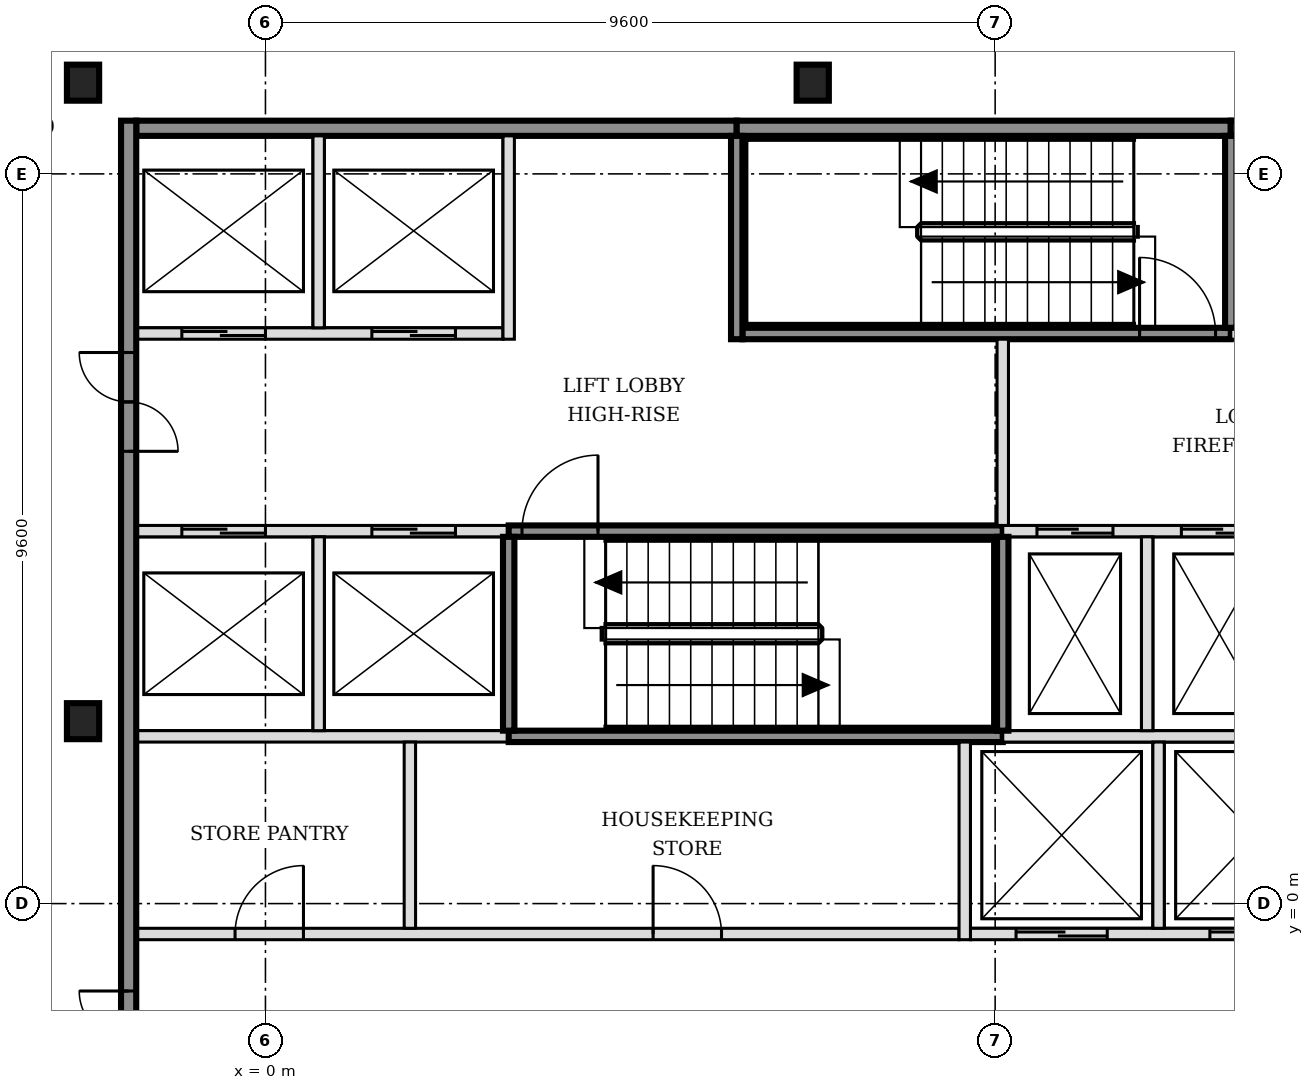
"""IFC4 building model, lengths in metres.
Left out: names, types, materials, properties, quantities, classifications, styles, units other than length and angle.
Written with IfcOpenShell. Run it as: python <this file> out.ifc"""

import sys

from ifc_helpers import new_model, si_unit, direction, frame, frame_2d, origin, origin_2d, place, context, subcontext, project, spatial, rectangle, i_section, extrude, element, fill, save


model = new_model("IFC4")
c1 = context("Model", 3, precision=1e-05, world=origin(), true_north=direction((0.0, 1.0)))
c2 = subcontext(c1, "Body", "Model", "MODEL_VIEW")
j1 = project(units=[si_unit("LENGTHUNIT", "METRE"), si_unit("PLANEANGLEUNIT", "RADIAN")], contexts=[c1])
p1 = place(None, origin())
s1 = spatial("IfcSite", under=j1, at=p1, CompositionType="ELEMENT")
p2 = place(p1, origin())
s2 = spatial("IfcBuilding", under=s1, at=p2, CompositionType="ELEMENT")
p3 = place(p2, frame((0.0, 0.0, 139.8)))
s3 = spatial("IfcBuildingStorey", under=s2, at=p3, CompositionType="ELEMENT", Elevation=139.8)
for number, where, z_axis, x_axis in (
    (1, (-2.4, 2.4, -0.15), (0.0, 0.0, 1.0), (1.0, 0.0, 0.0)),
    (2, (-2.4, 10.8, -0.15), (0.0, 0.0, 1.0), (1.0, 0.0, 0.0)),
    (3, (7.2, 10.8, -0.15), (0.0, 0.0, 1.0), (1.0, 0.0, 0.0)),
):
    element("IfcColumn", number, at=place(p3, frame(where, z_axis=z_axis, x_axis=x_axis)), inside=s3, PredefinedType="COLUMN", context=c2, shape_type="SweptSolid", body=[
        extrude(i_section(OverallWidth=0.424, OverallDepth=0.474, WebThickness=0.048, FlangeThickness=0.077, FilletRadius=0.015, at=origin_2d()), origin(), (0.0, 0.0, 1.0), 3.6),
    ])
p4 = place(p3, frame((-1.7, -0.4, 0.0), z_axis=(0.0, 0.0, 1.0), x_axis=(1.0, 0.0, 0.0)))
e4 = element("IfcWall", 4, at=p4, inside=s3, PredefinedType="PARTITIONING", context=c2, shape_type="SweptSolid", body=[
    extrude(rectangle(XDim=10.825, YDim=0.15, at=frame_2d((5.413, 0.0))), origin(), (0.0, 0.0, 1.0), 3.45),
])
p5 = place(p4, frame((1.3, 0.0, 0.0)))
e5 = element("IfcOpeningElement", 5, at=p5, cuts=e4, PredefinedType="OPENING", context=c2, shape_type="SweptSolid", body=[
    extrude(rectangle(XDim=0.9, YDim=2.1, at=frame_2d((0.45, 1.05))), frame((0.0, 0.085, 0.0), z_axis=(0.0, -1.0, 0.0), x_axis=(1.0, 0.0, 0.0)), (0.0, 0.0, 1.0), 0.17),
])
p6 = place(p4, frame((6.8, 0.0, 0.0)))
e6 = element("IfcOpeningElement", 6, at=p6, cuts=e4, PredefinedType="OPENING", context=c2, shape_type="SweptSolid", body=[
    extrude(rectangle(XDim=0.9, YDim=2.1, at=frame_2d((0.45, 1.05))), frame((0.0, 0.085, 0.0), z_axis=(0.0, -1.0, 0.0), x_axis=(1.0, 0.0, 0.0)), (0.0, 0.0, 1.0), 0.17),
])
p7 = place(p3, frame((9.275, -0.4, 0.0), z_axis=(0.0, 0.0, 1.0), x_axis=(1.0, 0.0, 0.0)))
e7 = element("IfcWall", 7, at=p7, inside=s3, PredefinedType="SOLIDWALL", context=c2, shape_type="SweptSolid", body=[
    extrude(rectangle(XDim=4.95, YDim=0.15, at=frame_2d((2.475, 0.0))), origin(), (0.0, 0.0, 1.0), 3.45),
])
p8 = place(p7, frame((0.6, 0.0, 0.0)))
e8 = element("IfcOpeningElement", 8, at=p8, cuts=e7, PredefinedType="OPENING", context=c2, shape_type="SweptSolid", body=[
    extrude(rectangle(XDim=1.2, YDim=2.1, at=frame_2d((0.6, 1.05))), frame((0.0, 0.085, 0.0), z_axis=(0.0, -1.0, 0.0), x_axis=(1.0, 0.0, 0.0)), (0.0, 0.0, 1.0), 0.17),
])
p9 = place(p7, frame((3.15, 0.0, 0.0)))
e9 = element("IfcOpeningElement", 9, at=p9, cuts=e7, PredefinedType="OPENING", context=c2, shape_type="SweptSolid", body=[
    extrude(rectangle(XDim=1.2, YDim=2.1, at=frame_2d((0.6, 1.05))), frame((0.0, 0.085, 0.0), z_axis=(0.0, -1.0, 0.0), x_axis=(1.0, 0.0, 0.0)), (0.0, 0.0, 1.0), 0.17),
])
p10 = place(p3, frame((-1.7, 2.2, 0.0), z_axis=(0.0, 0.0, 1.0), x_axis=(1.0, 0.0, 0.0)))
e10 = element("IfcWall", 10, at=p10, inside=s3, PredefinedType="SOLIDWALL", context=c2, shape_type="SweptSolid", body=[
    extrude(rectangle(XDim=4.9, YDim=0.15, at=frame_2d((2.45, 0.0))), origin(), (0.0, 0.0, 1.0), 3.45),
])
p11 = place(p3, frame((3.2, 2.2, 0.0), z_axis=(0.0, 0.0, 1.0), x_axis=(1.0, 0.0, 0.0)))
e11 = element("IfcWall", 11, at=p11, inside=s3, PredefinedType="SOLIDWALL", context=c2, shape_type="SweptSolid", body=[
    extrude(rectangle(XDim=6.5, YDim=0.15, at=frame_2d((3.25, 0.0))), origin(), (0.0, 0.0, 1.0), 3.45),
])
p12 = place(p3, frame((9.7, 2.2, 0.0), z_axis=(0.0, 0.0, 1.0), x_axis=(1.0, 0.0, 0.0)))
e12 = element("IfcWall", 12, at=p12, inside=s3, PredefinedType="SOLIDWALL", context=c2, shape_type="SweptSolid", body=[
    extrude(rectangle(XDim=4.525, YDim=0.15, at=frame_2d((2.263, 0.0))), origin(), (0.0, 0.0, 1.0), 3.45),
])
p13 = place(p3, frame((-1.7, 4.9, 0.0), z_axis=(0.0, 0.0, 1.0), x_axis=(1.0, 0.0, 0.0)))
e13 = element("IfcWall", 13, at=p13, inside=s3, PredefinedType="SOLIDWALL", context=c2, shape_type="SweptSolid", body=[
    extrude(rectangle(XDim=4.9, YDim=0.15, at=frame_2d((2.45, 0.0))), origin(), (0.0, 0.0, 1.0), 3.45),
])
p14 = place(p13, frame((0.6, 0.0, 0.0)))
e14 = element("IfcOpeningElement", 14, at=p14, cuts=e13, PredefinedType="OPENING", context=c2, shape_type="SweptSolid", body=[
    extrude(rectangle(XDim=1.1, YDim=2.1, at=frame_2d((0.55, 1.05))), frame((0.0, 0.085, 0.0), z_axis=(0.0, -1.0, 0.0), x_axis=(1.0, 0.0, 0.0)), (0.0, 0.0, 1.0), 0.17),
])
p15 = place(p13, frame((3.1, 0.0, 0.0)))
e15 = element("IfcOpeningElement", 15, at=p15, cuts=e13, PredefinedType="OPENING", context=c2, shape_type="SweptSolid", body=[
    extrude(rectangle(XDim=1.1, YDim=2.1, at=frame_2d((0.55, 1.05))), frame((0.0, 0.085, 0.0), z_axis=(0.0, -1.0, 0.0), x_axis=(1.0, 0.0, 0.0)), (0.0, 0.0, 1.0), 0.17),
])
p16 = place(p3, frame((3.2, 4.9, 0.0), z_axis=(0.0, 0.0, 1.0), x_axis=(1.0, 0.0, 0.0)))
e16 = element("IfcWall", 16, at=p16, inside=s3, PredefinedType="SOLIDWALL", context=c2, shape_type="SweptSolid", body=[
    extrude(rectangle(XDim=6.5, YDim=0.15, at=frame_2d((3.25, 0.0))), origin(), (0.0, 0.0, 1.0), 3.45),
])
p17 = place(p16, frame((0.175, 0.0, 0.0)))
e17 = element("IfcOpeningElement", 17, at=p17, cuts=e16, PredefinedType="OPENING", context=c2, shape_type="SweptSolid", body=[
    extrude(rectangle(XDim=1.0, YDim=2.1, at=frame_2d((0.5, 1.05))), frame((0.0, 0.085, 0.0), z_axis=(0.0, -1.0, 0.0), x_axis=(1.0, 0.0, 0.0)), (0.0, 0.0, 1.0), 0.17),
])
p18 = place(p3, frame((9.7, 4.9, 0.0), z_axis=(0.0, 0.0, 1.0), x_axis=(1.0, 0.0, 0.0)))
e18 = element("IfcWall", 18, at=p18, inside=s3, PredefinedType="SOLIDWALL", context=c2, shape_type="SweptSolid", body=[
    extrude(rectangle(XDim=6.4, YDim=0.15, at=frame_2d((3.2, 0.0))), origin(), (0.0, 0.0, 1.0), 3.45),
])
p19 = place(p18, frame((0.45, 0.0, 0.0)))
e19 = element("IfcOpeningElement", 19, at=p19, cuts=e18, PredefinedType="OPENING", context=c2, shape_type="SweptSolid", body=[
    extrude(rectangle(XDim=1.0, YDim=2.1, at=frame_2d((0.5, 1.05))), frame((0.0, 0.085, 0.0), z_axis=(0.0, -1.0, 0.0), x_axis=(1.0, 0.0, 0.0)), (0.0, 0.0, 1.0), 0.17),
])
p20 = place(p18, frame((2.35, 0.0, 0.0)))
e20 = element("IfcOpeningElement", 20, at=p20, cuts=e18, PredefinedType="OPENING", context=c2, shape_type="SweptSolid", body=[
    extrude(rectangle(XDim=1.0, YDim=2.1, at=frame_2d((0.5, 1.05))), frame((0.0, 0.085, 0.0), z_axis=(0.0, -1.0, 0.0), x_axis=(1.0, 0.0, 0.0)), (0.0, 0.0, 1.0), 0.17),
])
p21 = place(p18, frame((4.7, 0.0, 0.0)))
e21 = element("IfcOpeningElement", 21, at=p21, cuts=e18, PredefinedType="OPENING", context=c2, shape_type="SweptSolid", body=[
    extrude(rectangle(XDim=0.9, YDim=2.1, at=frame_2d((0.45, 1.05))), frame((0.0, 0.085, 0.0), z_axis=(0.0, -1.0, 0.0), x_axis=(1.0, 0.0, 0.0)), (0.0, 0.0, 1.0), 0.17),
])
p22 = place(p3, frame((-1.7, 7.5, 0.0), z_axis=(0.0, 0.0, 1.0), x_axis=(1.0, 0.0, 0.0)))
e22 = element("IfcWall", 22, at=p22, inside=s3, PredefinedType="SOLIDWALL", context=c2, shape_type="SweptSolid", body=[
    extrude(rectangle(XDim=4.825, YDim=0.15, at=frame_2d((2.413, 0.0))), origin(), (0.0, 0.0, 1.0), 3.45),
])
p23 = place(p22, frame((0.6, 0.0, 0.0)))
e23 = element("IfcOpeningElement", 23, at=p23, cuts=e22, PredefinedType="OPENING", context=c2, shape_type="SweptSolid", body=[
    extrude(rectangle(XDim=1.1, YDim=2.1, at=frame_2d((0.55, 1.05))), frame((0.0, 0.085, 0.0), z_axis=(0.0, -1.0, 0.0), x_axis=(1.0, 0.0, 0.0)), (0.0, 0.0, 1.0), 0.17),
])
p24 = place(p22, frame((3.1, 0.0, 0.0)))
e24 = element("IfcOpeningElement", 24, at=p24, cuts=e22, PredefinedType="OPENING", context=c2, shape_type="SweptSolid", body=[
    extrude(rectangle(XDim=1.1, YDim=2.1, at=frame_2d((0.55, 1.05))), frame((0.0, 0.085, 0.0), z_axis=(0.0, -1.0, 0.0), x_axis=(1.0, 0.0, 0.0)), (0.0, 0.0, 1.0), 0.17),
])
p25 = place(p3, frame((6.275, 7.5, 0.0), z_axis=(0.0, 0.0, 1.0), x_axis=(1.0, 0.0, 0.0)))
e25 = element("IfcWall", 25, at=p25, inside=s3, PredefinedType="SOLIDWALL", context=c2, shape_type="SweptSolid", body=[
    extrude(rectangle(XDim=6.425, YDim=0.15, at=frame_2d((3.212, 0.0))), origin(), (0.0, 0.0, 1.0), 3.45),
])
p26 = place(p25, frame((5.225, 0.0, 0.0)))
e26 = element("IfcOpeningElement", 26, at=p26, cuts=e25, PredefinedType="OPENING", context=c2, shape_type="SweptSolid", body=[
    extrude(rectangle(XDim=1.0, YDim=2.1, at=frame_2d((0.5, 1.05))), frame((0.0, 0.085, 0.0), z_axis=(0.0, -1.0, 0.0), x_axis=(1.0, 0.0, 0.0)), (0.0, 0.0, 1.0), 0.17),
])
p27 = place(p3, frame((12.7, 7.5, 0.0), z_axis=(0.0, 0.0, 1.0), x_axis=(1.0, 0.0, 0.0)))
e27 = element("IfcWall", 27, at=p27, inside=s3, PredefinedType="SOLIDWALL", context=c2, shape_type="SweptSolid", body=[
    extrude(rectangle(XDim=3.4, YDim=0.15, at=frame_2d((1.7, 0.0))), origin(), (0.0, 0.0, 1.0), 3.45),
])
p28 = place(p27, frame((1.3, 0.0, 0.0)))
e28 = element("IfcOpeningElement", 28, at=p28, cuts=e27, PredefinedType="OPENING", context=c2, shape_type="SweptSolid", body=[
    extrude(rectangle(XDim=0.9, YDim=2.1, at=frame_2d((0.45, 1.05))), frame((0.0, 0.085, 0.0), z_axis=(0.0, -1.0, 0.0), x_axis=(1.0, 0.0, 0.0)), (0.0, 0.0, 1.0), 0.17),
])
p29 = place(p3, frame((-1.7, 10.2, 0.0), z_axis=(0.0, 0.0, 1.0), x_axis=(1.0, 0.0, 0.0)))
e29 = element("IfcWall", 29, at=p29, inside=s3, PredefinedType="SOLIDWALL", context=c2, shape_type="SweptSolid", body=[
    extrude(rectangle(XDim=7.9, YDim=0.2, at=frame_2d((3.95, 0.0))), origin(), (0.0, 0.0, 1.0), 3.45),
])
p30 = place(p3, frame((6.2, 10.2, 0.0), z_axis=(0.0, 0.0, 1.0), x_axis=(1.0, 0.0, 0.0)))
e30 = element("IfcWall", 30, at=p30, inside=s3, PredefinedType="SOLIDWALL", context=c2, shape_type="SweptSolid", body=[
    extrude(rectangle(XDim=6.5, YDim=0.2, at=frame_2d((3.25, 0.0))), origin(), (0.0, 0.0, 1.0), 3.45),
])
p31 = place(p3, frame((12.7, 10.2, 0.0), z_axis=(0.0, 0.0, 1.0), x_axis=(1.0, 0.0, 0.0)))
e31 = element("IfcWall", 31, at=p31, inside=s3, PredefinedType="SOLIDWALL", context=c2, shape_type="SweptSolid", body=[
    extrude(rectangle(XDim=3.4, YDim=0.2, at=frame_2d((1.7, 0.0))), origin(), (0.0, 0.0, 1.0), 3.45),
])
p32 = place(p3, frame((-1.8, -5.5, 0.0), z_axis=(0.0, 0.0, 1.0), x_axis=(0.0, 1.0, 0.0)))
e32 = element("IfcWall", 32, at=p32, inside=s3, PredefinedType="SOLIDWALL", context=c2, shape_type="SweptSolid", body=[
    extrude(rectangle(XDim=15.8, YDim=0.2, at=frame_2d((7.9, 0.0))), origin(), (0.0, 0.0, 1.0), 3.45),
])
p33 = place(p32, frame((3.05, 0.0, 0.0)))
e33 = element("IfcOpeningElement", 33, at=p33, cuts=e32, PredefinedType="OPENING", context=c2, shape_type="SweptSolid", body=[
    extrude(rectangle(XDim=1.3, YDim=2.1, at=frame_2d((0.65, 1.05))), frame((0.0, 0.11, 0.0), z_axis=(0.0, -1.0, 0.0), x_axis=(1.0, 0.0, 0.0)), (0.0, 0.0, 1.0), 0.22),
])
p34 = place(p32, frame((11.45, 0.0, 0.0)))
e34 = element("IfcOpeningElement", 34, at=p34, cuts=e32, PredefinedType="OPENING", context=c2, shape_type="SweptSolid", body=[
    extrude(rectangle(XDim=1.3, YDim=2.1, at=frame_2d((0.65, 1.05))), frame((0.0, 0.11, 0.0), z_axis=(0.0, -1.0, 0.0), x_axis=(1.0, 0.0, 0.0)), (0.0, 0.0, 1.0), 0.22),
])
p35 = place(p3, frame((0.7, 2.275, 0.0), z_axis=(0.0, 0.0, 1.0), x_axis=(0.0, 1.0, 0.0)))
e35 = element("IfcWall", 35, at=p35, inside=s3, PredefinedType="SOLIDWALL", context=c2, shape_type="SweptSolid", body=[
    extrude(rectangle(XDim=2.55, YDim=0.15, at=frame_2d((1.275, 0.0))), origin(), (0.0, 0.0, 1.0), 3.45),
])
p36 = place(p3, frame((0.7, 7.575, 0.0), z_axis=(0.0, 0.0, 1.0), x_axis=(0.0, 1.0, 0.0)))
e36 = element("IfcWall", 36, at=p36, inside=s3, PredefinedType="SOLIDWALL", context=c2, shape_type="SweptSolid", body=[
    extrude(rectangle(XDim=2.525, YDim=0.15, at=frame_2d((1.263, 0.0))), origin(), (0.0, 0.0, 1.0), 3.45),
])
p37 = place(p3, frame((1.9, -0.325, 0.0), z_axis=(0.0, 0.0, 1.0), x_axis=(0.0, 1.0, 0.0)))
e37 = element("IfcWall", 37, at=p37, inside=s3, PredefinedType="PARTITIONING", context=c2, shape_type="SweptSolid", body=[
    extrude(rectangle(XDim=2.45, YDim=0.15, at=frame_2d((1.225, 0.0))), origin(), (0.0, 0.0, 1.0), 3.45),
])
p38 = place(p3, frame((3.2, 2.275, 0.0), z_axis=(0.0, 0.0, 1.0), x_axis=(0.0, 1.0, 0.0)))
e38 = element("IfcWall", 38, at=p38, inside=s3, PredefinedType="SOLIDWALL", context=c2, shape_type="SweptSolid", body=[
    extrude(rectangle(XDim=2.55, YDim=0.15, at=frame_2d((1.275, 0.0))), origin(), (0.0, 0.0, 1.0), 3.45),
])
for number, where, z_axis, x_axis in (
    (39, (3.2, 7.425, 0.0), (0.0, 0.0, 1.0), (0.0, 1.0, 0.0)),
    (40, (6.2, 7.425, 0.0), (0.0, 0.0, 1.0), (0.0, 1.0, 0.0)),
):
    element("IfcWall", number, at=place(p3, frame(where, z_axis=z_axis, x_axis=x_axis)), inside=s3, PredefinedType="SOLIDWALL", context=c2, shape_type="SweptSolid", body=[
        extrude(rectangle(XDim=2.675, YDim=0.15, at=frame_2d((1.337, 0.0))), origin(), (0.0, 0.0, 1.0), 3.45),
    ])
p39 = place(p3, frame((9.2, -0.475, 0.0), z_axis=(0.0, 0.0, 1.0), x_axis=(0.0, 1.0, 0.0)))
e41 = element("IfcWall", 41, at=p39, inside=s3, PredefinedType="SOLIDWALL", context=c2, shape_type="SweptSolid", body=[
    extrude(rectangle(XDim=2.6, YDim=0.15, at=frame_2d((1.3, 0.0))), origin(), (0.0, 0.0, 1.0), 3.45),
])
p40 = place(p3, frame((9.7, 2.275, 0.0), z_axis=(0.0, 0.0, 1.0), x_axis=(0.0, 1.0, 0.0)))
e42 = element("IfcWall", 42, at=p40, inside=s3, PredefinedType="SOLIDWALL", context=c2, shape_type="SweptSolid", body=[
    extrude(rectangle(XDim=2.55, YDim=0.15, at=frame_2d((1.275, 0.0))), origin(), (0.0, 0.0, 1.0), 3.45),
])
p41 = place(p3, frame((9.7, 4.975, 0.0), z_axis=(0.0, 0.0, 1.0), x_axis=(0.0, 1.0, 0.0)))
e43 = element("IfcWall", 43, at=p41, inside=s3, PredefinedType="SOLIDWALL", context=c2, shape_type="SweptSolid", body=[
    extrude(rectangle(XDim=2.45, YDim=0.15, at=frame_2d((1.225, 0.0))), origin(), (0.0, 0.0, 1.0), 3.45),
])
p42 = place(p3, frame((11.6, 2.275, 0.0), z_axis=(0.0, 0.0, 1.0), x_axis=(0.0, 1.0, 0.0)))
e44 = element("IfcWall", 44, at=p42, inside=s3, PredefinedType="SOLIDWALL", context=c2, shape_type="SweptSolid", body=[
    extrude(rectangle(XDim=2.55, YDim=0.15, at=frame_2d((1.275, 0.0))), origin(), (0.0, 0.0, 1.0), 3.45),
])
p43 = place(p3, frame((11.75, -0.325, 0.0), z_axis=(0.0, 0.0, 1.0), x_axis=(0.0, 1.0, 0.0)))
e45 = element("IfcWall", 45, at=p43, inside=s3, PredefinedType="SOLIDWALL", context=c2, shape_type="SweptSolid", body=[
    extrude(rectangle(XDim=2.45, YDim=0.15, at=frame_2d((1.225, 0.0))), origin(), (0.0, 0.0, 1.0), 3.45),
])
p44 = place(p3, frame((12.7, 7.575, 0.0), z_axis=(0.0, 0.0, 1.0), x_axis=(0.0, 1.0, 0.0)))
e46 = element("IfcWall", 46, at=p44, inside=s3, PredefinedType="SOLIDWALL", context=c2, shape_type="SweptSolid", body=[
    extrude(rectangle(XDim=2.525, YDim=0.15, at=frame_2d((1.263, 0.0))), origin(), (0.0, 0.0, 1.0), 3.45),
])
p45 = place(p8, origin())
e47 = element("IfcDoor", 47, at=p45, inside=s3, OperationType="DOUBLE_DOOR_SLIDING", PredefinedType="DOOR", context=c2, shape_type="SweptSolid", body=[
    extrude(rectangle(XDim=1.2, YDim=2.1, at=frame_2d((0.6, 1.05))), frame((0.0, 0.025, 0.0), z_axis=(0.0, -1.0, 0.0), x_axis=(1.0, 0.0, 0.0)), (0.0, 0.0, 1.0), 0.05),
])
fill(e8, e47)
p46 = place(p9, origin())
e48 = element("IfcDoor", 48, at=p46, inside=s3, OperationType="DOUBLE_DOOR_SLIDING", PredefinedType="DOOR", context=c2, shape_type="SweptSolid", body=[
    extrude(rectangle(XDim=1.2, YDim=2.1, at=frame_2d((0.6, 1.05))), frame((0.0, 0.025, 0.0), z_axis=(0.0, -1.0, 0.0), x_axis=(1.0, 0.0, 0.0)), (0.0, 0.0, 1.0), 0.05),
])
fill(e9, e48)
p47 = place(p14, origin())
e49 = element("IfcDoor", 49, at=p47, inside=s3, OperationType="DOUBLE_DOOR_SLIDING", PredefinedType="DOOR", context=c2, shape_type="SweptSolid", body=[
    extrude(rectangle(XDim=1.1, YDim=2.1, at=frame_2d((0.55, 1.05))), frame((0.0, 0.025, 0.0), z_axis=(0.0, -1.0, 0.0), x_axis=(1.0, 0.0, 0.0)), (0.0, 0.0, 1.0), 0.05),
])
fill(e14, e49)
p48 = place(p15, origin())
e50 = element("IfcDoor", 50, at=p48, inside=s3, OperationType="DOUBLE_DOOR_SLIDING", PredefinedType="DOOR", context=c2, shape_type="SweptSolid", body=[
    extrude(rectangle(XDim=1.1, YDim=2.1, at=frame_2d((0.55, 1.05))), frame((0.0, 0.025, 0.0), z_axis=(0.0, -1.0, 0.0), x_axis=(1.0, 0.0, 0.0)), (0.0, 0.0, 1.0), 0.05),
])
fill(e15, e50)
p49 = place(p23, origin())
e51 = element("IfcDoor", 51, at=p49, inside=s3, OperationType="DOUBLE_DOOR_SLIDING", PredefinedType="DOOR", context=c2, shape_type="SweptSolid", body=[
    extrude(rectangle(XDim=1.1, YDim=2.1, at=frame_2d((0.55, 1.05))), frame((0.0, 0.025, 0.0), z_axis=(0.0, -1.0, 0.0), x_axis=(1.0, 0.0, 0.0)), (0.0, 0.0, 1.0), 0.05),
])
fill(e23, e51)
p50 = place(p24, origin())
e52 = element("IfcDoor", 52, at=p50, inside=s3, OperationType="DOUBLE_DOOR_SLIDING", PredefinedType="DOOR", context=c2, shape_type="SweptSolid", body=[
    extrude(rectangle(XDim=1.1, YDim=2.1, at=frame_2d((0.55, 1.05))), frame((0.0, 0.025, 0.0), z_axis=(0.0, -1.0, 0.0), x_axis=(1.0, 0.0, 0.0)), (0.0, 0.0, 1.0), 0.05),
])
fill(e24, e52)
p51 = place(p19, origin())
e53 = element("IfcDoor", 53, at=p51, inside=s3, OperationType="DOUBLE_DOOR_SLIDING", PredefinedType="DOOR", context=c2, shape_type="SweptSolid", body=[
    extrude(rectangle(XDim=1.0, YDim=2.1, at=frame_2d((0.5, 1.05))), frame((0.0, 0.025, 0.0), z_axis=(0.0, -1.0, 0.0), x_axis=(1.0, 0.0, 0.0)), (0.0, 0.0, 1.0), 0.05),
])
fill(e19, e53)
p52 = place(p20, origin())
e54 = element("IfcDoor", 54, at=p52, inside=s3, OperationType="DOUBLE_DOOR_SLIDING", PredefinedType="DOOR", context=c2, shape_type="SweptSolid", body=[
    extrude(rectangle(XDim=1.0, YDim=2.1, at=frame_2d((0.5, 1.05))), frame((0.0, 0.025, 0.0), z_axis=(0.0, -1.0, 0.0), x_axis=(1.0, 0.0, 0.0)), (0.0, 0.0, 1.0), 0.05),
])
fill(e20, e54)
p53 = place(p17, origin())
e55 = element("IfcDoor", 55, at=p53, inside=s3, OperationType="SINGLE_SWING_RIGHT", PredefinedType="DOOR", context=c2, shape_type="SweptSolid", body=[
    extrude(rectangle(XDim=1.0, YDim=2.1, at=frame_2d((0.5, 1.05))), frame((0.0, 0.025, 0.0), z_axis=(0.0, -1.0, 0.0), x_axis=(1.0, 0.0, 0.0)), (0.0, 0.0, 1.0), 0.05),
])
fill(e17, e55)
p54 = place(p26, origin())
e56 = element("IfcDoor", 56, at=p54, inside=s3, OperationType="SINGLE_SWING_LEFT", PredefinedType="DOOR", context=c2, shape_type="SweptSolid", body=[
    extrude(rectangle(XDim=1.0, YDim=2.1, at=frame_2d((0.5, 1.05))), frame((0.0, 0.025, 0.0), z_axis=(0.0, -1.0, 0.0), x_axis=(1.0, 0.0, 0.0)), (0.0, 0.0, 1.0), 0.05),
])
fill(e26, e56)
p55 = place(p33, origin())
e57 = element("IfcDoor", 57, at=p55, inside=s3, OperationType="DOUBLE_DOOR_SINGLE_SWING", PredefinedType="DOOR", context=c2, shape_type="SweptSolid", body=[
    extrude(rectangle(XDim=1.3, YDim=2.1, at=frame_2d((0.65, 1.05))), frame((0.0, 0.025, 0.0), z_axis=(0.0, -1.0, 0.0), x_axis=(1.0, 0.0, 0.0)), (0.0, 0.0, 1.0), 0.05),
])
fill(e33, e57)
p56 = place(p34, origin())
e58 = element("IfcDoor", 58, at=p56, inside=s3, OperationType="DOUBLE_DOOR_SINGLE_SWING", PredefinedType="DOOR", context=c2, shape_type="SweptSolid", body=[
    extrude(rectangle(XDim=1.3, YDim=2.1, at=frame_2d((0.65, 1.05))), frame((0.0, 0.025, 0.0), z_axis=(0.0, -1.0, 0.0), x_axis=(1.0, 0.0, 0.0)), (0.0, 0.0, 1.0), 0.05),
])
fill(e34, e58)
p57 = place(p5, origin())
e59 = element("IfcDoor", 59, at=p57, inside=s3, OperationType="SINGLE_SWING_RIGHT", PredefinedType="DOOR", context=c2, shape_type="SweptSolid", body=[
    extrude(rectangle(XDim=0.9, YDim=2.1, at=frame_2d((0.45, 1.05))), frame((0.0, 0.025, 0.0), z_axis=(0.0, -1.0, 0.0), x_axis=(1.0, 0.0, 0.0)), (0.0, 0.0, 1.0), 0.05),
])
fill(e5, e59)
p58 = place(p6, origin())
e60 = element("IfcDoor", 60, at=p58, inside=s3, OperationType="SINGLE_SWING_LEFT", PredefinedType="DOOR", context=c2, shape_type="SweptSolid", body=[
    extrude(rectangle(XDim=0.9, YDim=2.1, at=frame_2d((0.45, 1.05))), frame((0.0, 0.025, 0.0), z_axis=(0.0, -1.0, 0.0), x_axis=(1.0, 0.0, 0.0)), (0.0, 0.0, 1.0), 0.05),
])
fill(e6, e60)
save(model, sys.argv[1])
